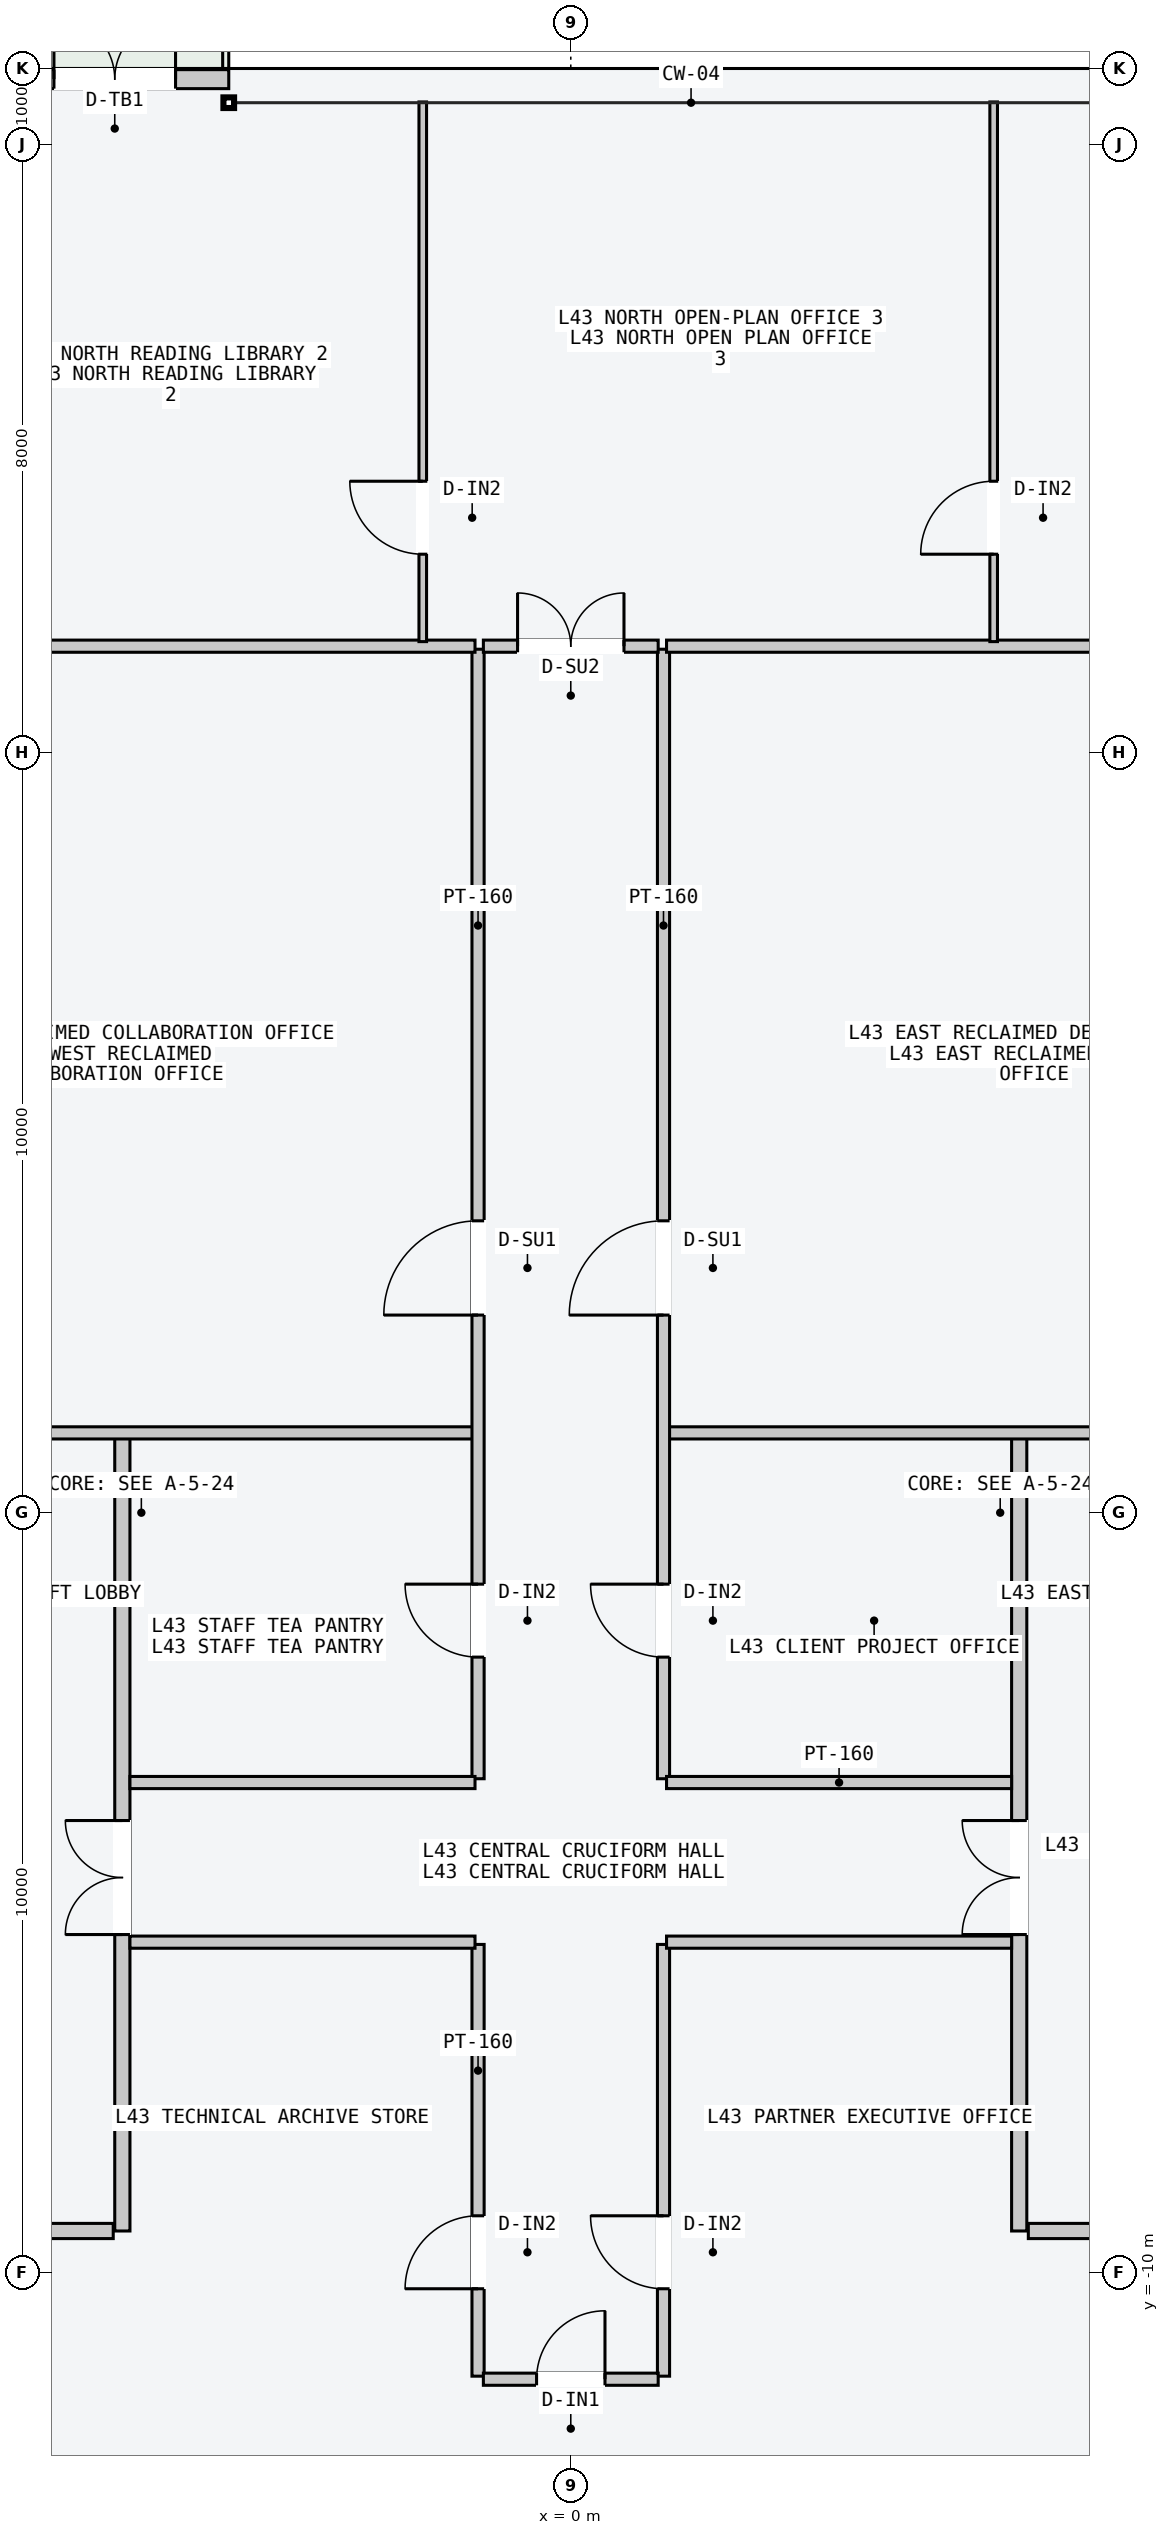
"""IFC4 building model, lengths in metres.
Left out: names, types, materials, properties, quantities, classifications, styles, units other than length and angle.
Written with IfcOpenShell. Run it as: python <this file> out.ifc"""

import sys

from ifc_helpers import new_model, si_unit, direction, frame, frame_2d, origin, place, context, subcontext, project, spatial, rectangle, extrude, element, fill, save


model = new_model("IFC4")
c1 = context("Model", 3, precision=1e-05, world=origin(), true_north=direction((0.0, 1.0)))
c2 = subcontext(c1, "Body", "Model", "MODEL_VIEW")
j1 = project(units=[si_unit("LENGTHUNIT", "METRE"), si_unit("PLANEANGLEUNIT", "RADIAN")], contexts=[c1])
p1 = place(None, origin())
s1 = spatial("IfcSite", under=j1, at=p1, CompositionType="ELEMENT")
p2 = place(p1, origin())
s2 = spatial("IfcBuilding", under=s1, at=p2, CompositionType="ELEMENT")
p3 = place(p2, frame((0.0, 0.0, 165.9)))
s3 = spatial("IfcBuildingStorey", under=s2, at=p3, CompositionType="ELEMENT", Elevation=165.9)
p4 = place(p3, frame((-7.655, 18.86, 0.0), z_axis=(0.0, 0.0, 1.0), x_axis=(1.0, 0.0, 0.0)))
e1 = element("IfcWall", 1, at=p4, inside=s3, PredefinedType="STANDARD", context=c2, shape_type="SweptSolid", body=[
    extrude(rectangle(XDim=3.155, YDim=0.25, at=frame_2d((1.578, 0.0))), origin(), (0.0, 0.0, 1.0), 3.4),
])
p5 = place(p4, frame((0.855, 0.0, 0.0)))
e2 = element("IfcOpeningElement", 2, at=p5, cuts=e1, PredefinedType="OPENING", context=c2, shape_type="SweptSolid", body=[
    extrude(rectangle(XDim=1.6, YDim=2.2, at=frame_2d((0.8, 1.1))), frame((0.0, 0.135, 0.0), z_axis=(0.0, -1.0, 0.0), x_axis=(1.0, 0.0, 0.0)), (0.0, 0.0, 1.0), 0.27),
])
p6 = place(p3, frame((-5.9, -9.45, 0.0), z_axis=(0.0, 0.0, 1.0), x_axis=(0.0, 1.0, 0.0)))
e3 = element("IfcWall", 3, at=p6, inside=s3, PredefinedType="PARTITIONING", context=c2, shape_type="SweptSolid", body=[
    extrude(rectangle(XDim=10.5, YDim=0.2, at=frame_2d((5.25, 0.0))), origin(), (0.0, 0.0, 1.0), 3.4),
])
p7 = place(p6, frame((3.9, 0.0, 0.0)))
e4 = element("IfcOpeningElement", 4, at=p7, cuts=e3, PredefinedType="OPENING", context=c2, shape_type="SweptSolid", body=[
    extrude(rectangle(XDim=1.5, YDim=2.2, at=frame_2d((0.75, 1.1))), frame((0.0, 0.11, 0.0), z_axis=(0.0, -1.0, 0.0), x_axis=(1.0, 0.0, 0.0)), (0.0, 0.0, 1.0), 0.22),
])
p8 = place(p3, frame((-6.02, -9.45, 0.0), z_axis=(0.0, 0.0, 1.0), x_axis=(-1.0, 0.0, 0.0)))
e5 = element("IfcWall", 5, at=p8, inside=s3, PredefinedType="PARTITIONING", context=c2, shape_type="SweptSolid", body=[
    extrude(rectangle(XDim=1.8, YDim=0.2, at=frame_2d((0.9, 0.0))), origin(), (0.0, 0.0, 1.0), 3.4),
])
p9 = place(p3, frame((5.9, -9.45, 0.0), z_axis=(0.0, 0.0, 1.0), x_axis=(0.0, 1.0, 0.0)))
e6 = element("IfcWall", 6, at=p9, inside=s3, PredefinedType="PARTITIONING", context=c2, shape_type="SweptSolid", body=[
    extrude(rectangle(XDim=10.5, YDim=0.2, at=frame_2d((5.25, 0.0))), origin(), (0.0, 0.0, 1.0), 3.4),
])
p10 = place(p9, frame((3.9, 0.0, 0.0)))
e7 = element("IfcOpeningElement", 7, at=p10, cuts=e6, PredefinedType="OPENING", context=c2, shape_type="SweptSolid", body=[
    extrude(rectangle(XDim=1.5, YDim=2.2, at=frame_2d((0.75, 1.1))), frame((0.0, 0.11, 0.0), z_axis=(0.0, -1.0, 0.0), x_axis=(1.0, 0.0, 0.0)), (0.0, 0.0, 1.0), 0.22),
])
p11 = place(p3, frame((6.02, -9.45, 0.0), z_axis=(0.0, 0.0, 1.0), x_axis=(1.0, 0.0, 0.0)))
e8 = element("IfcWall", 8, at=p11, inside=s3, PredefinedType="PARTITIONING", context=c2, shape_type="SweptSolid", body=[
    extrude(rectangle(XDim=1.8, YDim=0.2, at=frame_2d((0.9, 0.0))), origin(), (0.0, 0.0, 1.0), 3.4),
])
p12 = place(p3, frame((-10.05, 1.05, 0.0), z_axis=(0.0, 0.0, 1.0), x_axis=(1.0, 0.0, 0.0)))
e9 = element("IfcWall", 9, at=p12, inside=s3, PredefinedType="PARTITIONING", context=c2, shape_type="SweptSolid", body=[
    extrude(rectangle(XDim=8.79, YDim=0.16, at=frame_2d((4.395, 0.0))), origin(), (0.0, 0.0, 1.0), 3.4),
])
p13 = place(p3, frame((-1.22, -3.5, 0.0), z_axis=(0.0, 0.0, 1.0), x_axis=(0.0, 1.0, 0.0)))
e10 = element("IfcWall", 10, at=p13, inside=s3, PredefinedType="PARTITIONING", context=c2, shape_type="SweptSolid", body=[
    extrude(rectangle(XDim=14.86, YDim=0.16, at=frame_2d((7.43, 0.0))), origin(), (0.0, 0.0, 1.0), 3.4),
])
p14 = place(p13, frame((6.1, 0.0, 0.0)))
e11 = element("IfcOpeningElement", 11, at=p14, cuts=e10, PredefinedType="OPENING", context=c2, shape_type="SweptSolid", body=[
    extrude(rectangle(XDim=1.24, YDim=2.24, at=frame_2d((0.62, 1.12))), frame((0.0, 0.09, 0.0), z_axis=(0.0, -1.0, 0.0), x_axis=(1.0, 0.0, 0.0)), (0.0, 0.0, 1.0), 0.18),
])
p15 = place(p13, frame((1.6, 0.0, 0.0)))
e12 = element("IfcOpeningElement", 12, at=p15, cuts=e10, PredefinedType="OPENING", context=c2, shape_type="SweptSolid", body=[
    extrude(rectangle(XDim=0.96, YDim=2.18, at=frame_2d((0.48, 1.09))), frame((0.0, 0.09, 0.0), z_axis=(0.0, -1.0, 0.0), x_axis=(1.0, 0.0, 0.0)), (0.0, 0.0, 1.0), 0.18),
])
p16 = place(p3, frame((-7.5, 11.4, 0.0), z_axis=(0.0, 0.0, 1.0), x_axis=(1.0, 0.0, 0.0)))
e13 = element("IfcWall", 13, at=p16, inside=s3, PredefinedType="PARTITIONING", context=c2, shape_type="SweptSolid", body=[
    extrude(rectangle(XDim=6.24, YDim=0.16, at=frame_2d((3.12, 0.0))), origin(), (0.0, 0.0, 1.0), 3.4),
])
p17 = place(p3, frame((-5.8, -3.55, 0.0), z_axis=(0.0, 0.0, 1.0), x_axis=(1.0, 0.0, 0.0)))
e14 = element("IfcWall", 14, at=p17, inside=s3, PredefinedType="PARTITIONING", context=c2, shape_type="SweptSolid", body=[
    extrude(rectangle(XDim=4.54, YDim=0.16, at=frame_2d((2.27, 0.0))), origin(), (0.0, 0.0, 1.0), 3.4),
])
p18 = place(p3, frame((1.26, 1.05, 0.0), z_axis=(0.0, 0.0, 1.0), x_axis=(1.0, 0.0, 0.0)))
e15 = element("IfcWall", 15, at=p18, inside=s3, PredefinedType="PARTITIONING", context=c2, shape_type="SweptSolid", body=[
    extrude(rectangle(XDim=8.8, YDim=0.16, at=frame_2d((4.4, 0.0))), origin(), (0.0, 0.0, 1.0), 3.4),
])
p19 = place(p3, frame((1.22, -3.5, 0.0), z_axis=(0.0, 0.0, 1.0), x_axis=(0.0, 1.0, 0.0)))
e16 = element("IfcWall", 16, at=p19, inside=s3, PredefinedType="PARTITIONING", context=c2, shape_type="SweptSolid", body=[
    extrude(rectangle(XDim=14.86, YDim=0.16, at=frame_2d((7.43, 0.0))), origin(), (0.0, 0.0, 1.0), 3.4),
])
p20 = place(p19, frame((6.1, 0.0, 0.0)))
e17 = element("IfcOpeningElement", 17, at=p20, cuts=e16, PredefinedType="OPENING", context=c2, shape_type="SweptSolid", body=[
    extrude(rectangle(XDim=1.24, YDim=2.24, at=frame_2d((0.62, 1.12))), frame((0.0, 0.09, 0.0), z_axis=(0.0, -1.0, 0.0), x_axis=(1.0, 0.0, 0.0)), (0.0, 0.0, 1.0), 0.18),
])
p21 = place(p19, frame((1.6, 0.0, 0.0)))
e18 = element("IfcOpeningElement", 18, at=p21, cuts=e16, PredefinedType="OPENING", context=c2, shape_type="SweptSolid", body=[
    extrude(rectangle(XDim=0.96, YDim=2.18, at=frame_2d((0.48, 1.09))), frame((0.0, 0.09, 0.0), z_axis=(0.0, -1.0, 0.0), x_axis=(1.0, 0.0, 0.0)), (0.0, 0.0, 1.0), 0.18),
])
p22 = place(p3, frame((1.26, 11.4, 0.0), z_axis=(0.0, 0.0, 1.0), x_axis=(1.0, 0.0, 0.0)))
e19 = element("IfcWall", 19, at=p22, inside=s3, PredefinedType="PARTITIONING", context=c2, shape_type="SweptSolid", body=[
    extrude(rectangle(XDim=6.24, YDim=0.16, at=frame_2d((3.12, 0.0))), origin(), (0.0, 0.0, 1.0), 3.4),
])
p23 = place(p3, frame((1.26, -3.55, 0.0), z_axis=(0.0, 0.0, 1.0), x_axis=(1.0, 0.0, 0.0)))
e20 = element("IfcWall", 20, at=p23, inside=s3, PredefinedType="PARTITIONING", context=c2, shape_type="SweptSolid", body=[
    extrude(rectangle(XDim=4.54, YDim=0.16, at=frame_2d((2.27, 0.0))), origin(), (0.0, 0.0, 1.0), 3.4),
])
p24 = place(p3, frame((-1.22, -11.36, 0.0), z_axis=(0.0, 0.0, 1.0), x_axis=(0.0, 1.0, 0.0)))
e21 = element("IfcWall", 21, at=p24, inside=s3, PredefinedType="PARTITIONING", context=c2, shape_type="SweptSolid", body=[
    extrude(rectangle(XDim=5.68, YDim=0.16, at=frame_2d((2.84, 0.0))), origin(), (0.0, 0.0, 1.0), 3.4),
])
p25 = place(p24, frame((1.15, 0.0, 0.0)))
e22 = element("IfcOpeningElement", 22, at=p25, cuts=e21, PredefinedType="OPENING", context=c2, shape_type="SweptSolid", body=[
    extrude(rectangle(XDim=0.96, YDim=2.18, at=frame_2d((0.48, 1.09))), frame((0.0, 0.09, 0.0), z_axis=(0.0, -1.0, 0.0), x_axis=(1.0, 0.0, 0.0)), (0.0, 0.0, 1.0), 0.18),
])
p26 = place(p3, frame((1.22, -11.36, 0.0), z_axis=(0.0, 0.0, 1.0), x_axis=(0.0, 1.0, 0.0)))
e23 = element("IfcWall", 23, at=p26, inside=s3, PredefinedType="PARTITIONING", context=c2, shape_type="SweptSolid", body=[
    extrude(rectangle(XDim=5.68, YDim=0.16, at=frame_2d((2.84, 0.0))), origin(), (0.0, 0.0, 1.0), 3.4),
])
p27 = place(p26, frame((1.15, 0.0, 0.0)))
e24 = element("IfcOpeningElement", 24, at=p27, cuts=e23, PredefinedType="OPENING", context=c2, shape_type="SweptSolid", body=[
    extrude(rectangle(XDim=0.96, YDim=2.18, at=frame_2d((0.48, 1.09))), frame((0.0, 0.09, 0.0), z_axis=(0.0, -1.0, 0.0), x_axis=(1.0, 0.0, 0.0)), (0.0, 0.0, 1.0), 0.18),
])
for number, where, z_axis, x_axis in (
    (25, (-5.8, -5.65, 0.0), (0.0, 0.0, 1.0), (1.0, 0.0, 0.0)),
    (26, (1.26, -5.65, 0.0), (0.0, 0.0, 1.0), (1.0, 0.0, 0.0)),
):
    element("IfcWall", number, at=place(p3, frame(where, z_axis=z_axis, x_axis=x_axis)), inside=s3, PredefinedType="PARTITIONING", context=c2, shape_type="SweptSolid", body=[
        extrude(rectangle(XDim=4.54, YDim=0.16, at=frame_2d((2.27, 0.0))), origin(), (0.0, 0.0, 1.0), 3.4),
    ])
p28 = place(p3, frame((-1.948, 11.46, 0.0), z_axis=(0.0, 0.0, 1.0), x_axis=(0.0, 1.0, 0.0)))
e27 = element("IfcWall", 27, at=p28, inside=s3, PredefinedType="PARTITIONING", context=c2, shape_type="SweptSolid", body=[
    extrude(rectangle(XDim=7.1, YDim=0.1, at=frame_2d((3.55, 0.0))), origin(), (0.0, 0.0, 1.0), 3.4),
])
p29 = place(p28, frame((1.15, 0.0, 0.0)))
e28 = element("IfcOpeningElement", 28, at=p29, cuts=e27, PredefinedType="OPENING", context=c2, shape_type="SweptSolid", body=[
    extrude(rectangle(XDim=0.96, YDim=2.18, at=frame_2d((0.48, 1.09))), frame((0.0, 0.06, 0.0), z_axis=(0.0, -1.0, 0.0), x_axis=(1.0, 0.0, 0.0)), (0.0, 0.0, 1.0), 0.12),
])
p30 = place(p3, frame((5.564, 11.46, 0.0), z_axis=(0.0, 0.0, 1.0), x_axis=(0.0, 1.0, 0.0)))
e29 = element("IfcWall", 29, at=p30, inside=s3, PredefinedType="PARTITIONING", context=c2, shape_type="SweptSolid", body=[
    extrude(rectangle(XDim=7.1, YDim=0.1, at=frame_2d((3.55, 0.0))), origin(), (0.0, 0.0, 1.0), 3.4),
])
p31 = place(p30, frame((1.15, 0.0, 0.0)))
e30 = element("IfcOpeningElement", 30, at=p31, cuts=e29, PredefinedType="OPENING", context=c2, shape_type="SweptSolid", body=[
    extrude(rectangle(XDim=0.96, YDim=2.18, at=frame_2d((0.48, 1.09))), frame((0.0, 0.06, 0.0), z_axis=(0.0, -1.0, 0.0), x_axis=(1.0, 0.0, 0.0)), (0.0, 0.0, 1.0), 0.12),
])
p32 = place(p3, frame((-1.15, 11.4, 0.0), z_axis=(0.0, 0.0, 1.0), x_axis=(1.0, 0.0, 0.0)))
e31 = element("IfcWall", 31, at=p32, inside=s3, PredefinedType="PARTITIONING", context=c2, shape_type="SweptSolid", body=[
    extrude(rectangle(XDim=2.3, YDim=0.16, at=frame_2d((1.15, 0.0))), origin(), (0.0, 0.0, 1.0), 3.4),
])
p33 = place(p32, frame((0.45, 0.0, 0.0)))
e32 = element("IfcOpeningElement", 32, at=p33, cuts=e31, PredefinedType="OPENING", context=c2, shape_type="SweptSolid", body=[
    extrude(rectangle(XDim=1.4, YDim=2.2, at=frame_2d((0.7, 1.1))), frame((0.0, 0.09, 0.0), z_axis=(0.0, -1.0, 0.0), x_axis=(1.0, 0.0, 0.0)), (0.0, 0.0, 1.0), 0.18),
])
p34 = place(p3, frame((-1.15, -11.4, 0.0), z_axis=(0.0, 0.0, 1.0), x_axis=(1.0, 0.0, 0.0)))
e33 = element("IfcWall", 33, at=p34, inside=s3, PredefinedType="PARTITIONING", context=c2, shape_type="SweptSolid", body=[
    extrude(rectangle(XDim=2.3, YDim=0.16, at=frame_2d((1.15, 0.0))), origin(), (0.0, 0.0, 1.0), 3.4),
])
p35 = place(p34, frame((0.7, 0.0, 0.0)))
e34 = element("IfcOpeningElement", 34, at=p35, cuts=e33, PredefinedType="OPENING", context=c2, shape_type="SweptSolid", body=[
    extrude(rectangle(XDim=0.9, YDim=2.15, at=frame_2d((0.45, 1.075))), frame((0.0, 0.09, 0.0), z_axis=(0.0, -1.0, 0.0), x_axis=(1.0, 0.0, 0.0)), (0.0, 0.0, 1.0), 0.18),
])
p36 = place(p5, origin())
e35 = element("IfcDoor", 35, at=p36, inside=s3, OperationType="DOUBLE_DOOR_SINGLE_SWING", PredefinedType="DOOR", context=c2, shape_type="SweptSolid", body=[
    extrude(rectangle(XDim=1.6, YDim=2.2, at=frame_2d((0.8, 1.1))), frame((0.0, 0.025, 0.0), z_axis=(0.0, -1.0, 0.0), x_axis=(1.0, 0.0, 0.0)), (0.0, 0.0, 1.0), 0.05),
])
fill(e2, e35)
p37 = place(p7, origin())
e36 = element("IfcDoor", 36, at=p37, inside=s3, OperationType="DOUBLE_DOOR_SINGLE_SWING", PredefinedType="DOOR", context=c2, shape_type="SweptSolid", body=[
    extrude(rectangle(XDim=1.5, YDim=2.2, at=frame_2d((0.75, 1.1))), frame((0.0, 0.025, 0.0), z_axis=(0.0, -1.0, 0.0), x_axis=(1.0, 0.0, 0.0)), (0.0, 0.0, 1.0), 0.05),
])
fill(e4, e36)
p38 = place(p10, origin())
e37 = element("IfcDoor", 37, at=p38, inside=s3, OperationType="DOUBLE_DOOR_SINGLE_SWING", PredefinedType="DOOR", context=c2, shape_type="SweptSolid", body=[
    extrude(rectangle(XDim=1.5, YDim=2.2, at=frame_2d((0.75, 1.1))), frame((0.0, 0.025, 0.0), z_axis=(0.0, -1.0, 0.0), x_axis=(1.0, 0.0, 0.0)), (0.0, 0.0, 1.0), 0.05),
])
fill(e7, e37)
p39 = place(p14, origin())
e38 = element("IfcDoor", 38, at=p39, inside=s3, OperationType="SINGLE_SWING_LEFT", PredefinedType="DOOR", context=c2, shape_type="SweptSolid", body=[
    extrude(rectangle(XDim=1.24, YDim=2.24, at=frame_2d((0.62, 1.12))), frame((0.0, 0.025, 0.0), z_axis=(0.0, -1.0, 0.0), x_axis=(1.0, 0.0, 0.0)), (0.0, 0.0, 1.0), 0.05),
])
fill(e11, e38)
p40 = place(p15, origin())
e39 = element("IfcDoor", 39, at=p40, inside=s3, OperationType="SINGLE_SWING_RIGHT", PredefinedType="DOOR", context=c2, shape_type="SweptSolid", body=[
    extrude(rectangle(XDim=0.96, YDim=2.18, at=frame_2d((0.48, 1.09))), frame((0.0, 0.025, 0.0), z_axis=(0.0, -1.0, 0.0), x_axis=(1.0, 0.0, 0.0)), (0.0, 0.0, 1.0), 0.05),
])
fill(e12, e39)
p41 = place(p20, origin())
e40 = element("IfcDoor", 40, at=p41, inside=s3, OperationType="SINGLE_SWING_LEFT", PredefinedType="DOOR", context=c2, shape_type="SweptSolid", body=[
    extrude(rectangle(XDim=1.24, YDim=2.24, at=frame_2d((0.62, 1.12))), frame((0.0, 0.025, 0.0), z_axis=(0.0, -1.0, 0.0), x_axis=(1.0, 0.0, 0.0)), (0.0, 0.0, 1.0), 0.05),
])
fill(e17, e40)
p42 = place(p21, origin())
e41 = element("IfcDoor", 41, at=p42, inside=s3, OperationType="SINGLE_SWING_RIGHT", PredefinedType="DOOR", context=c2, shape_type="SweptSolid", body=[
    extrude(rectangle(XDim=0.96, YDim=2.18, at=frame_2d((0.48, 1.09))), frame((0.0, 0.025, 0.0), z_axis=(0.0, -1.0, 0.0), x_axis=(1.0, 0.0, 0.0)), (0.0, 0.0, 1.0), 0.05),
])
fill(e18, e41)
p43 = place(p25, origin())
e42 = element("IfcDoor", 42, at=p43, inside=s3, OperationType="SINGLE_SWING_LEFT", PredefinedType="DOOR", context=c2, shape_type="SweptSolid", body=[
    extrude(rectangle(XDim=0.96, YDim=2.18, at=frame_2d((0.48, 1.09))), frame((0.0, 0.025, 0.0), z_axis=(0.0, -1.0, 0.0), x_axis=(1.0, 0.0, 0.0)), (0.0, 0.0, 1.0), 0.05),
])
fill(e22, e42)
p44 = place(p27, origin())
e43 = element("IfcDoor", 43, at=p44, inside=s3, OperationType="SINGLE_SWING_RIGHT", PredefinedType="DOOR", context=c2, shape_type="SweptSolid", body=[
    extrude(rectangle(XDim=0.96, YDim=2.18, at=frame_2d((0.48, 1.09))), frame((0.0, 0.025, 0.0), z_axis=(0.0, -1.0, 0.0), x_axis=(1.0, 0.0, 0.0)), (0.0, 0.0, 1.0), 0.05),
])
fill(e24, e43)
p45 = place(p29, origin())
e44 = element("IfcDoor", 44, at=p45, inside=s3, OperationType="SINGLE_SWING_RIGHT", PredefinedType="DOOR", context=c2, shape_type="SweptSolid", body=[
    extrude(rectangle(XDim=0.96, YDim=2.18, at=frame_2d((0.48, 1.09))), frame((0.0, 0.025, 0.0), z_axis=(0.0, -1.0, 0.0), x_axis=(1.0, 0.0, 0.0)), (0.0, 0.0, 1.0), 0.05),
])
fill(e28, e44)
p46 = place(p31, origin())
e45 = element("IfcDoor", 45, at=p46, inside=s3, OperationType="SINGLE_SWING_LEFT", PredefinedType="DOOR", context=c2, shape_type="SweptSolid", body=[
    extrude(rectangle(XDim=0.96, YDim=2.18, at=frame_2d((0.48, 1.09))), frame((0.0, 0.025, 0.0), z_axis=(0.0, -1.0, 0.0), x_axis=(1.0, 0.0, 0.0)), (0.0, 0.0, 1.0), 0.05),
])
fill(e30, e45)
p47 = place(p33, origin())
e46 = element("IfcDoor", 46, at=p47, inside=s3, OperationType="DOUBLE_DOOR_SINGLE_SWING", PredefinedType="DOOR", context=c2, shape_type="SweptSolid", body=[
    extrude(rectangle(XDim=1.4, YDim=2.2, at=frame_2d((0.7, 1.1))), frame((0.0, 0.025, 0.0), z_axis=(0.0, -1.0, 0.0), x_axis=(1.0, 0.0, 0.0)), (0.0, 0.0, 1.0), 0.05),
])
fill(e32, e46)
p48 = place(p35, origin())
e47 = element("IfcDoor", 47, at=p48, inside=s3, OperationType="SINGLE_SWING_RIGHT", PredefinedType="DOOR", context=c2, shape_type="SweptSolid", body=[
    extrude(rectangle(XDim=0.9, YDim=2.15, at=frame_2d((0.45, 1.075))), frame((0.0, 0.025, 0.0), z_axis=(0.0, -1.0, 0.0), x_axis=(1.0, 0.0, 0.0)), (0.0, 0.0, 1.0), 0.05),
])
fill(e34, e47)
save(model, sys.argv[1])
